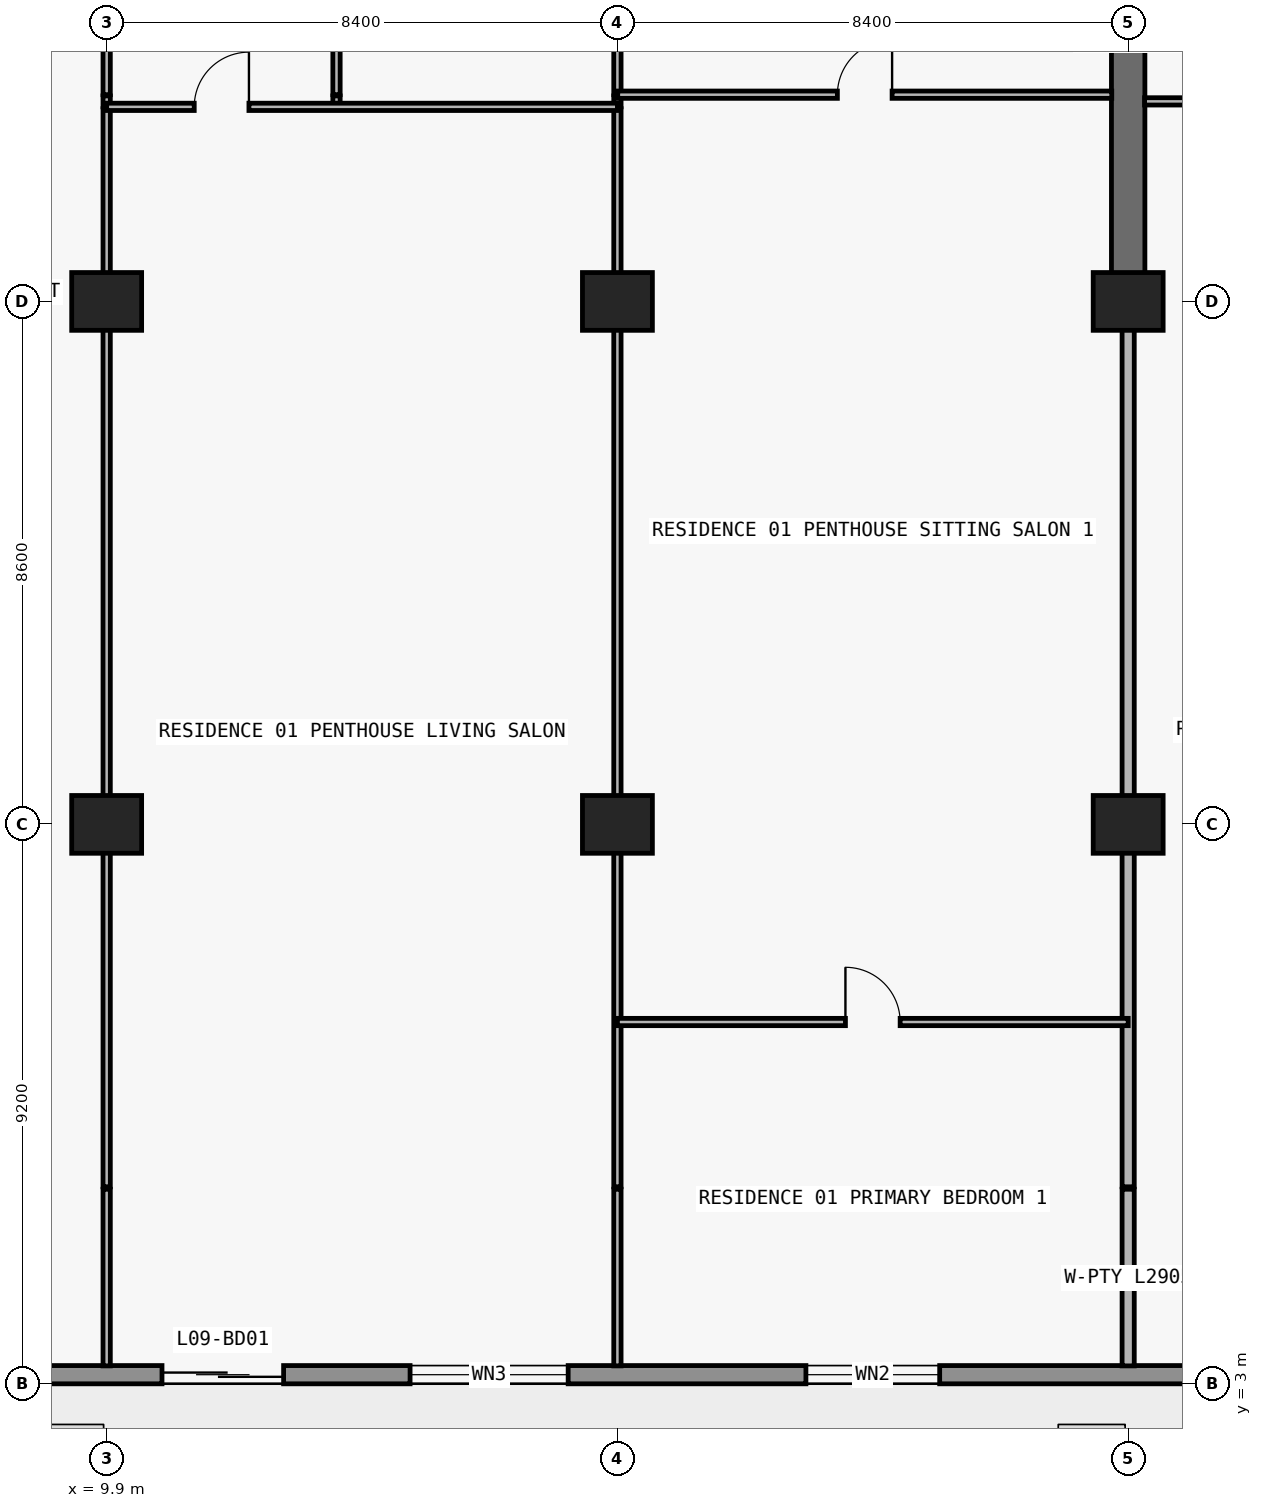
"""IFC4 building model, lengths in metres.
Left out: names, types, materials, properties, quantities, classifications, styles, units other than length and angle.
Written with IfcOpenShell. Run it as: python <this file> out.ifc"""

import sys

from ifc_helpers import new_model, si_unit, direction, frame, frame_2d, origin, origin_2d, place, context, subcontext, project, spatial, rectangle, extrude, element, fill, save


model = new_model("IFC4")
c1 = context("Model", 3, precision=1e-05, world=origin(), true_north=direction((0.0, 1.0)))
c2 = subcontext(c1, "Body", "Model", "MODEL_VIEW")
j1 = project(units=[si_unit("LENGTHUNIT", "METRE"), si_unit("PLANEANGLEUNIT", "RADIAN")], contexts=[c1])
p1 = place(None, origin())
s1 = spatial("IfcSite", under=j1, at=p1, CompositionType="ELEMENT")
p2 = place(p1, origin())
s2 = spatial("IfcBuilding", under=s1, at=p2, CompositionType="ELEMENT")
p3 = place(p2, frame((0.0, 0.0, 39.9)))
s3 = spatial("IfcBuildingStorey", under=s2, at=p3, CompositionType="ELEMENT", Elevation=39.9)
for number, where, z_axis, x_axis in (
    (1, (9.9, 12.2, 0.0), (0.0, 0.0, 1.0), (1.0, 0.0, 0.0)),
    (2, (18.3, 12.2, 0.0), (0.0, 0.0, 1.0), (1.0, 0.0, 0.0)),
    (3, (26.7, 12.2, 0.0), (0.0, 0.0, 1.0), (1.0, 0.0, 0.0)),
    (4, (9.9, 20.8, 0.0), (0.0, 0.0, 1.0), (1.0, 0.0, 0.0)),
    (5, (18.3, 20.8, 0.0), (0.0, 0.0, 1.0), (1.0, 0.0, 0.0)),
    (6, (26.7, 20.8, 0.0), (0.0, 0.0, 1.0), (1.0, 0.0, 0.0)),
):
    element("IfcColumn", number, at=place(p3, frame(where, z_axis=z_axis, x_axis=x_axis)), inside=s3, PredefinedType="COLUMN", context=c2, shape_type="SweptSolid", body=[
        extrude(rectangle(XDim=1.15, YDim=0.95, at=origin_2d()), origin(), (0.0, 0.0, 1.0), 3.05),
    ])
p4 = place(p3, frame((26.7, 20.8, 0.0), z_axis=(0.0, 0.0, 1.0), x_axis=(0.0, 1.0, 0.0)))
e7 = element("IfcWall", 7, at=p4, inside=s3, PredefinedType="SHEAR", context=c2, shape_type="SweptSolid", body=[
    extrude(rectangle(XDim=8.6, YDim=0.55, at=frame_2d((4.3, 0.0))), origin(), (0.0, 0.0, 1.0), 3.05),
])
p5 = place(p3, frame((72.7, 3.15, 0.0), z_axis=(0.0, 0.0, 1.0), x_axis=(-1.0, 0.0, 0.0)))
e8 = element("IfcWall", 8, at=p5, inside=s3, PredefinedType="STANDARD", context=c2, shape_type="SweptSolid", body=[
    extrude(rectangle(XDim=67.6, YDim=0.3, at=frame_2d((33.8, 0.0))), origin(), (0.0, 0.0, 1.0), 3.05),
])
p6 = place(p5, frame((59.89, 0.0, 0.0)))
e9 = element("IfcOpeningElement", 9, at=p6, cuts=e8, PredefinedType="OPENING", context=c2, shape_type="SweptSolid", body=[
    extrude(rectangle(XDim=2.0, YDim=2.3, at=frame_2d((1.0, 1.15))), frame((0.0, 0.16, 0.0), z_axis=(0.0, -1.0, 0.0), x_axis=(1.0, 0.0, 0.0)), (0.0, 0.0, 1.0), 0.32),
])
p7 = place(p5, frame((55.21, 0.0, 0.65)))
e10 = element("IfcOpeningElement", 10, at=p7, cuts=e8, PredefinedType="OPENING", context=c2, shape_type="SweptSolid", body=[
    extrude(rectangle(XDim=2.6, YDim=1.85, at=frame_2d((1.3, 0.925))), frame((0.0, 0.16, 0.0), z_axis=(0.0, -1.0, 0.0), x_axis=(1.0, 0.0, 0.0)), (0.0, 0.0, 1.0), 0.32),
])
p8 = place(p5, frame((49.1, 0.0, 0.85)))
e11 = element("IfcOpeningElement", 11, at=p8, cuts=e8, PredefinedType="OPENING", context=c2, shape_type="SweptSolid", body=[
    extrude(rectangle(XDim=2.2, YDim=1.55, at=frame_2d((1.1, 0.775))), frame((0.0, 0.16, 0.0), z_axis=(0.0, -1.0, 0.0), x_axis=(1.0, 0.0, 0.0)), (0.0, 0.0, 1.0), 0.32),
])
p9 = place(p5, frame((42.69, 0.0, 0.0)))
e12 = element("IfcOpeningElement", 12, at=p9, cuts=e8, PredefinedType="OPENING", context=c2, shape_type="SweptSolid", body=[
    extrude(rectangle(XDim=2.0, YDim=2.3, at=frame_2d((1.0, 1.15))), frame((0.0, 0.16, 0.0), z_axis=(0.0, -1.0, 0.0), x_axis=(1.0, 0.0, 0.0)), (0.0, 0.0, 1.0), 0.32),
])
p10 = place(p5, frame((38.59, 0.0, 0.85)))
e13 = element("IfcOpeningElement", 13, at=p10, cuts=e8, PredefinedType="OPENING", context=c2, shape_type="SweptSolid", body=[
    extrude(rectangle(XDim=1.8, YDim=1.55, at=frame_2d((0.9, 0.775))), frame((0.0, 0.16, 0.0), z_axis=(0.0, -1.0, 0.0), x_axis=(1.0, 0.0, 0.0)), (0.0, 0.0, 1.0), 0.32),
])
p11 = place(p5, frame((30.914, 0.0, 0.85)))
e14 = element("IfcOpeningElement", 14, at=p11, cuts=e8, PredefinedType="OPENING", context=c2, shape_type="SweptSolid", body=[
    extrude(rectangle(XDim=2.2, YDim=1.55, at=frame_2d((1.1, 0.775))), frame((0.0, 0.16, 0.0), z_axis=(0.0, -1.0, 0.0), x_axis=(1.0, 0.0, 0.0)), (0.0, 0.0, 1.0), 0.32),
])
p12 = place(p5, frame((26.69, 0.0, 0.0)))
e15 = element("IfcOpeningElement", 15, at=p12, cuts=e8, PredefinedType="OPENING", context=c2, shape_type="SweptSolid", body=[
    extrude(rectangle(XDim=2.0, YDim=2.3, at=frame_2d((1.0, 1.15))), frame((0.0, 0.16, 0.0), z_axis=(0.0, -1.0, 0.0), x_axis=(1.0, 0.0, 0.0)), (0.0, 0.0, 1.0), 0.32),
])
p13 = place(p5, frame((22.59, 0.0, 0.85)))
e16 = element("IfcOpeningElement", 16, at=p13, cuts=e8, PredefinedType="OPENING", context=c2, shape_type="SweptSolid", body=[
    extrude(rectangle(XDim=1.8, YDim=1.55, at=frame_2d((0.9, 0.775))), frame((0.0, 0.16, 0.0), z_axis=(0.0, -1.0, 0.0), x_axis=(1.0, 0.0, 0.0)), (0.0, 0.0, 1.0), 0.32),
])
p14 = place(p5, frame((18.69, 0.0, 0.0)))
e17 = element("IfcOpeningElement", 17, at=p14, cuts=e8, PredefinedType="OPENING", context=c2, shape_type="SweptSolid", body=[
    extrude(rectangle(XDim=2.0, YDim=2.3, at=frame_2d((1.0, 1.15))), frame((0.0, 0.16, 0.0), z_axis=(0.0, -1.0, 0.0), x_axis=(1.0, 0.0, 0.0)), (0.0, 0.0, 1.0), 0.32),
])
p15 = place(p5, frame((14.01, 0.0, 0.65)))
e18 = element("IfcOpeningElement", 18, at=p15, cuts=e8, PredefinedType="OPENING", context=c2, shape_type="SweptSolid", body=[
    extrude(rectangle(XDim=2.6, YDim=1.85, at=frame_2d((1.3, 0.925))), frame((0.0, 0.16, 0.0), z_axis=(0.0, -1.0, 0.0), x_axis=(1.0, 0.0, 0.0)), (0.0, 0.0, 1.0), 0.32),
])
p16 = place(p5, frame((7.9, 0.0, 0.85)))
e19 = element("IfcOpeningElement", 19, at=p16, cuts=e8, PredefinedType="OPENING", context=c2, shape_type="SweptSolid", body=[
    extrude(rectangle(XDim=2.2, YDim=1.55, at=frame_2d((1.1, 0.775))), frame((0.0, 0.16, 0.0), z_axis=(0.0, -1.0, 0.0), x_axis=(1.0, 0.0, 0.0)), (0.0, 0.0, 1.0), 0.32),
])
p17 = place(p3, frame((9.9, 3.295, 0.0), z_axis=(0.0, 0.0, 1.0), x_axis=(0.0, 1.0, 0.0)))
e20 = element("IfcWall", 20, at=p17, inside=s3, PredefinedType="PARTITIONING", context=c2, shape_type="SweptSolid", body=[
    extrude(rectangle(XDim=2.905, YDim=0.12, at=frame_2d((1.453, 0.0))), origin(), (0.0, 0.0, 1.0), 3.05),
])
p18 = place(p3, frame((9.9, 6.24, 0.0), z_axis=(0.0, 0.0, 1.0), x_axis=(0.0, 1.0, 0.0)))
e21 = element("IfcWall", 21, at=p18, inside=s3, PredefinedType="PARTITIONING", context=c2, shape_type="SweptSolid", body=[
    extrude(rectangle(XDim=17.73, YDim=0.12, at=frame_2d((8.865, 0.0))), origin(), (0.0, 0.0, 1.0), 2.11),
])
p19 = place(p3, frame((9.9, 24.0, 0.0), z_axis=(0.0, 0.0, 1.0), x_axis=(0.0, 1.0, 0.0)))
e22 = element("IfcWall", 22, at=p19, inside=s3, PredefinedType="PARTITIONING", context=c2, shape_type="SweptSolid", body=[
    extrude(rectangle(XDim=0.18, YDim=0.12, at=frame_2d((0.09, 0.0))), origin(), (0.0, 0.0, 1.0), 2.11),
])
p20 = place(p3, frame((9.9, 24.2, 0.0), z_axis=(0.0, 0.0, 1.0), x_axis=(0.0, 1.0, 0.0)))
e23 = element("IfcWall", 23, at=p20, inside=s3, PredefinedType="PARTITIONING", context=c2, shape_type="SweptSolid", body=[
    extrude(rectangle(XDim=4.38, YDim=0.12, at=frame_2d((2.19, 0.0))), origin(), (0.0, 0.0, 1.0), 2.11),
])
p21 = place(p20, frame((1.74, 0.0, 0.0)))
e24 = element("IfcOpeningElement", 24, at=p21, cuts=e23, PredefinedType="OPENING", context=c2, shape_type="SweptSolid", body=[
    extrude(rectangle(XDim=0.9, YDim=2.06, at=frame_2d((0.45, 1.03))), frame((0.0, 0.07, 0.0), z_axis=(0.0, -1.0, 0.0), x_axis=(1.0, 0.0, 0.0)), (0.0, 0.0, 1.0), 0.14),
])
p22 = place(p3, frame((13.68, 24.0, 0.0), z_axis=(0.0, 0.0, 1.0), x_axis=(0.0, 1.0, 0.0)))
e25 = element("IfcWall", 25, at=p22, inside=s3, PredefinedType="PARTITIONING", context=c2, shape_type="SweptSolid", body=[
    extrude(rectangle(XDim=0.18, YDim=0.12, at=frame_2d((0.09, 0.0))), origin(), (0.0, 0.0, 1.0), 3.05),
])
p23 = place(p3, frame((13.68, 24.2, 0.0), z_axis=(0.0, 0.0, 1.0), x_axis=(0.0, 1.0, 0.0)))
e26 = element("IfcWall", 26, at=p23, inside=s3, PredefinedType="PARTITIONING", context=c2, shape_type="SweptSolid", body=[
    extrude(rectangle(XDim=4.38, YDim=0.12, at=frame_2d((2.19, 0.0))), origin(), (0.0, 0.0, 1.0), 3.05),
])
p24 = place(p23, frame((1.74, 0.0, 0.0)))
e27 = element("IfcOpeningElement", 27, at=p24, cuts=e26, PredefinedType="OPENING", context=c2, shape_type="SweptSolid", body=[
    extrude(rectangle(XDim=0.9, YDim=2.15, at=frame_2d((0.45, 1.075))), frame((0.0, 0.07, 0.0), z_axis=(0.0, -1.0, 0.0), x_axis=(1.0, 0.0, 0.0)), (0.0, 0.0, 1.0), 0.14),
])
p25 = place(p3, frame((18.3, 3.295, 0.0), z_axis=(0.0, 0.0, 1.0), x_axis=(0.0, 1.0, 0.0)))
e28 = element("IfcWall", 28, at=p25, inside=s3, PredefinedType="PARTITIONING", context=c2, shape_type="SweptSolid", body=[
    extrude(rectangle(XDim=2.905, YDim=0.12, at=frame_2d((1.453, 0.0))), origin(), (0.0, 0.0, 1.0), 3.05),
])
p26 = place(p3, frame((18.3, 6.24, 0.0), z_axis=(0.0, 0.0, 1.0), x_axis=(0.0, 1.0, 0.0)))
e29 = element("IfcWall", 29, at=p26, inside=s3, PredefinedType="PARTITIONING", context=c2, shape_type="SweptSolid", body=[
    extrude(rectangle(XDim=17.73, YDim=0.12, at=frame_2d((8.865, 0.0))), origin(), (0.0, 0.0, 1.0), 2.11),
])
p27 = place(p3, frame((18.3, 24.0, 0.0), z_axis=(0.0, 0.0, 1.0), x_axis=(0.0, 1.0, 0.0)))
e30 = element("IfcWall", 30, at=p27, inside=s3, PredefinedType="PARTITIONING", context=c2, shape_type="SweptSolid", body=[
    extrude(rectangle(XDim=0.18, YDim=0.12, at=frame_2d((0.09, 0.0))), origin(), (0.0, 0.0, 1.0), 2.11),
])
p28 = place(p3, frame((18.3, 24.2, 0.0), z_axis=(0.0, 0.0, 1.0), x_axis=(0.0, 1.0, 0.0)))
e31 = element("IfcWall", 31, at=p28, inside=s3, PredefinedType="PARTITIONING", context=c2, shape_type="SweptSolid", body=[
    extrude(rectangle(XDim=4.38, YDim=0.12, at=frame_2d((2.19, 0.0))), origin(), (0.0, 0.0, 1.0), 2.11),
])
p29 = place(p28, frame((1.74, 0.0, 0.0)))
e32 = element("IfcOpeningElement", 32, at=p29, cuts=e31, PredefinedType="OPENING", context=c2, shape_type="SweptSolid", body=[
    extrude(rectangle(XDim=0.9, YDim=2.06, at=frame_2d((0.45, 1.03))), frame((0.0, 0.07, 0.0), z_axis=(0.0, -1.0, 0.0), x_axis=(1.0, 0.0, 0.0)), (0.0, 0.0, 1.0), 0.14),
])
p30 = place(p3, frame((26.7, 3.295, 0.0), z_axis=(0.0, 0.0, 1.0), x_axis=(0.0, 1.0, 0.0)))
e33 = element("IfcWall", 33, at=p30, inside=s3, PredefinedType="PARTITIONING", context=c2, shape_type="SweptSolid", body=[
    extrude(rectangle(XDim=2.905, YDim=0.2, at=frame_2d((1.453, 0.0))), origin(), (0.0, 0.0, 1.0), 3.05),
])
p31 = place(p3, frame((26.7, 6.24, 0.0), z_axis=(0.0, 0.0, 1.0), x_axis=(0.0, 1.0, 0.0)))
e34 = element("IfcWall", 34, at=p31, inside=s3, PredefinedType="PARTITIONING", context=c2, shape_type="SweptSolid", body=[
    extrude(rectangle(XDim=14.555, YDim=0.2, at=frame_2d((7.277, 0.0))), origin(), (0.0, 0.0, 1.0), 2.11),
])
p32 = place(p3, frame((18.3, 8.95, 0.0), z_axis=(0.0, 0.0, 1.0), x_axis=(1.0, 0.0, 0.0)))
e35 = element("IfcWall", 35, at=p32, inside=s3, PredefinedType="PARTITIONING", context=c2, shape_type="SweptSolid", body=[
    extrude(rectangle(XDim=8.4, YDim=0.12, at=frame_2d((4.2, 0.0))), origin(), (0.0, 0.0, 1.0), 3.05),
])
p33 = place(p32, frame((3.75, 0.0, 0.0)))
e36 = element("IfcOpeningElement", 36, at=p33, cuts=e35, PredefinedType="OPENING", context=c2, shape_type="SweptSolid", body=[
    extrude(rectangle(XDim=0.9, YDim=2.15, at=frame_2d((0.45, 1.075))), frame((0.0, 0.07, 0.0), z_axis=(0.0, -1.0, 0.0), x_axis=(1.0, 0.0, 0.0)), (0.0, 0.0, 1.0), 0.14),
])
p34 = place(p3, frame((9.9, 24.0, 0.0), z_axis=(0.0, 0.0, 1.0), x_axis=(1.0, 0.0, 0.0)))
e37 = element("IfcWall", 37, at=p34, inside=s3, PredefinedType="PARTITIONING", context=c2, shape_type="SweptSolid", body=[
    extrude(rectangle(XDim=8.4, YDim=0.12, at=frame_2d((4.2, 0.0))), origin(), (0.0, 0.0, 1.0), 3.05),
])
p35 = place(p34, frame((1.44, 0.0, 0.0)))
e38 = element("IfcOpeningElement", 38, at=p35, cuts=e37, PredefinedType="OPENING", context=c2, shape_type="SweptSolid", body=[
    extrude(rectangle(XDim=0.9, YDim=2.15, at=frame_2d((0.45, 1.075))), frame((0.0, 0.07, 0.0), z_axis=(0.0, -1.0, 0.0), x_axis=(1.0, 0.0, 0.0)), (0.0, 0.0, 1.0), 0.14),
])
p36 = place(p3, frame((26.97, 24.09, 0.0), z_axis=(0.0, 0.0, 1.0), x_axis=(1.0, 0.0, 0.0)))
e39 = element("IfcWall", 39, at=p36, inside=s3, PredefinedType="PARTITIONING", context=c2, shape_type="SweptSolid", body=[
    extrude(rectangle(XDim=8.13, YDim=0.12, at=frame_2d((4.065, 0.0))), origin(), (0.0, 0.0, 1.0), 3.05),
])
p37 = place(p36, frame((1.558, 0.0, 0.0)))
e40 = element("IfcOpeningElement", 40, at=p37, cuts=e39, PredefinedType="OPENING", context=c2, shape_type="SweptSolid", body=[
    extrude(rectangle(XDim=0.9, YDim=2.15, at=frame_2d((0.45, 1.075))), frame((0.0, 0.07, 0.0), z_axis=(0.0, -1.0, 0.0), x_axis=(1.0, 0.0, 0.0)), (0.0, 0.0, 1.0), 0.14),
])
p38 = place(p36, frame((5.79, 0.0, 0.0)))
e41 = element("IfcOpeningElement", 41, at=p38, cuts=e39, PredefinedType="OPENING", context=c2, shape_type="SweptSolid", body=[
    extrude(rectangle(XDim=0.9, YDim=2.15, at=frame_2d((0.45, 1.075))), frame((0.0, 0.07, 0.0), z_axis=(0.0, -1.0, 0.0), x_axis=(1.0, 0.0, 0.0)), (0.0, 0.0, 1.0), 0.14),
])
p39 = place(p3, frame((18.305, 24.2, 0.0), z_axis=(0.0, 0.0, 1.0), x_axis=(1.0, 0.0, 0.0)))
e42 = element("IfcWall", 42, at=p39, inside=s3, PredefinedType="PARTITIONING", context=c2, shape_type="SweptSolid", body=[
    extrude(rectangle(XDim=8.125, YDim=0.12, at=frame_2d((4.062, 0.0))), origin(), (0.0, 0.0, 1.0), 3.05),
])
p40 = place(p39, frame((3.613, 0.0, 0.0)))
e43 = element("IfcOpeningElement", 43, at=p40, cuts=e42, PredefinedType="OPENING", context=c2, shape_type="SweptSolid", body=[
    extrude(rectangle(XDim=0.9, YDim=2.15, at=frame_2d((0.45, 1.075))), frame((0.0, 0.07, 0.0), z_axis=(0.0, -1.0, 0.0), x_axis=(1.0, 0.0, 0.0)), (0.0, 0.0, 1.0), 0.14),
])
p41 = place(p6, origin())
e44 = element("IfcDoor", 44, at=p41, inside=s3, OperationType="DOUBLE_DOOR_SLIDING", PredefinedType="DOOR", context=c2, shape_type="SweptSolid", body=[
    extrude(rectangle(XDim=2.0, YDim=2.3, at=frame_2d((1.0, 1.15))), frame((0.0, 0.025, 0.0), z_axis=(0.0, -1.0, 0.0), x_axis=(1.0, 0.0, 0.0)), (0.0, 0.0, 1.0), 0.05),
])
fill(e9, e44)
p42 = place(p7, origin())
e45 = element("IfcWindow", 45, at=p42, inside=s3, PartitioningType="SINGLE_PANEL", PredefinedType="WINDOW", context=c2, shape_type="SweptSolid", body=[
    extrude(rectangle(XDim=2.6, YDim=1.85, at=frame_2d((1.3, 0.925))), frame((0.0, 0.03, 0.0), z_axis=(0.0, -1.0, 0.0), x_axis=(1.0, 0.0, 0.0)), (0.0, 0.0, 1.0), 0.06),
])
fill(e10, e45)
p43 = place(p8, origin())
e46 = element("IfcWindow", 46, at=p43, inside=s3, PartitioningType="SINGLE_PANEL", PredefinedType="WINDOW", context=c2, shape_type="SweptSolid", body=[
    extrude(rectangle(XDim=2.2, YDim=1.55, at=frame_2d((1.1, 0.775))), frame((0.0, 0.03, 0.0), z_axis=(0.0, -1.0, 0.0), x_axis=(1.0, 0.0, 0.0)), (0.0, 0.0, 1.0), 0.06),
])
fill(e11, e46)
p44 = place(p35, origin())
e47 = element("IfcDoor", 47, at=p44, inside=s3, OperationType="SINGLE_SWING_RIGHT", PredefinedType="DOOR", context=c2, shape_type="SweptSolid", body=[
    extrude(rectangle(XDim=0.9, YDim=2.15, at=frame_2d((0.45, 1.075))), frame((0.0, 0.025, 0.0), z_axis=(0.0, -1.0, 0.0), x_axis=(1.0, 0.0, 0.0)), (0.0, 0.0, 1.0), 0.05),
])
fill(e38, e47)
p45 = place(p40, origin())
e48 = element("IfcDoor", 48, at=p45, inside=s3, OperationType="SINGLE_SWING_RIGHT", PredefinedType="DOOR", context=c2, shape_type="SweptSolid", body=[
    extrude(rectangle(XDim=0.9, YDim=2.15, at=frame_2d((0.45, 1.075))), frame((0.0, 0.025, 0.0), z_axis=(0.0, -1.0, 0.0), x_axis=(1.0, 0.0, 0.0)), (0.0, 0.0, 1.0), 0.05),
])
fill(e43, e48)
p46 = place(p33, origin())
e49 = element("IfcDoor", 49, at=p46, inside=s3, OperationType="SINGLE_SWING_LEFT", PredefinedType="DOOR", context=c2, shape_type="SweptSolid", body=[
    extrude(rectangle(XDim=0.9, YDim=2.15, at=frame_2d((0.45, 1.075))), frame((0.0, 0.025, 0.0), z_axis=(0.0, -1.0, 0.0), x_axis=(1.0, 0.0, 0.0)), (0.0, 0.0, 1.0), 0.05),
])
fill(e36, e49)
save(model, sys.argv[1])
